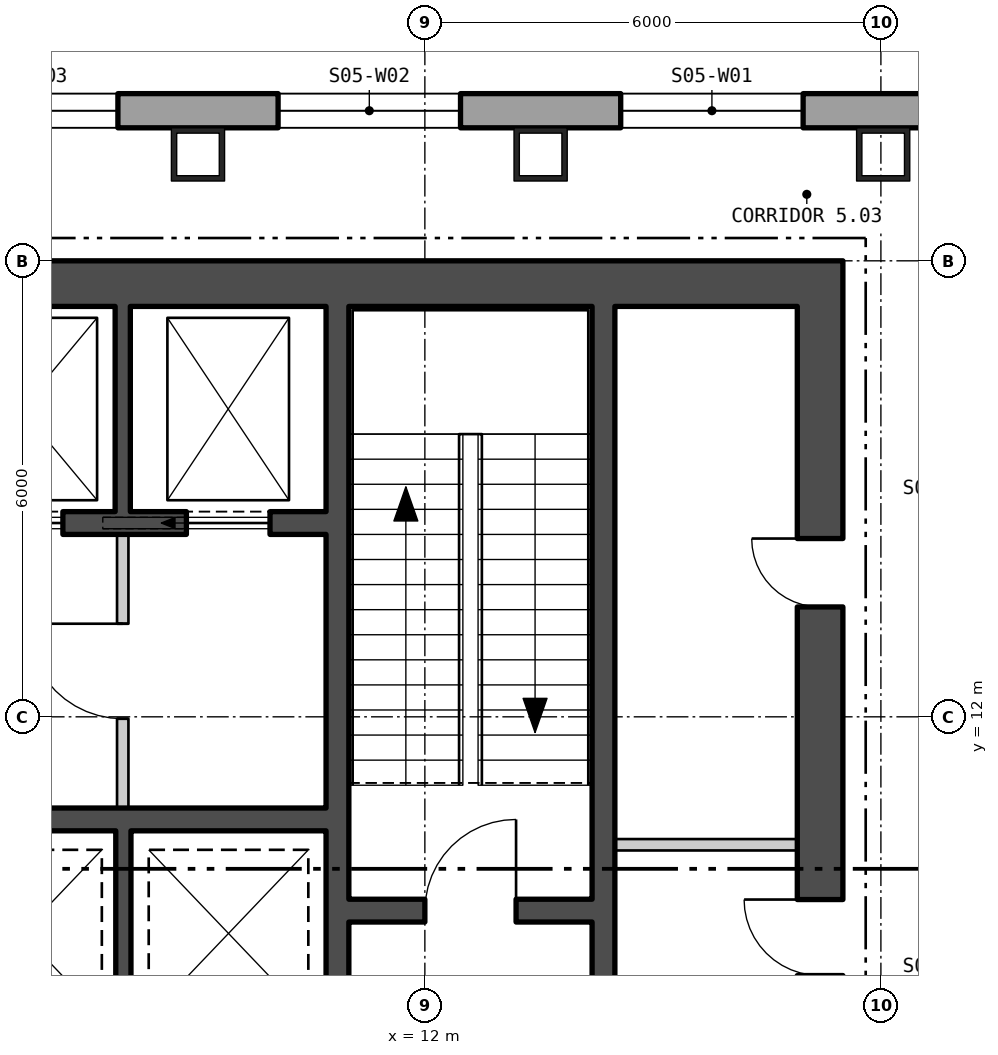
"""IFC4 building model, lengths in metres.
Left out: names, types, materials, properties, quantities, classifications, styles, units other than length and angle.
Written with IfcOpenShell. Run it as: python <this file> out.ifc"""

import sys

from ifc_helpers import new_model, si_unit, direction, frame, frame_2d, origin, origin_2d, place, context, subcontext, project, spatial, polyline, rectangle, hollow_rectangle, outline, extrude, element, fill, save


model = new_model("IFC4")
c1 = context("Model", 3, precision=1e-05, world=origin(), true_north=direction((0.0, 1.0)))
c2 = subcontext(c1, "Body", "Model", "MODEL_VIEW")
j1 = project(units=[si_unit("LENGTHUNIT", "METRE"), si_unit("PLANEANGLEUNIT", "RADIAN")], contexts=[c1])
p1 = place(None, origin())
s1 = spatial("IfcSite", under=j1, at=p1, CompositionType="ELEMENT")
p2 = place(p1, origin())
s2 = spatial("IfcBuilding", under=s1, at=p2, CompositionType="ELEMENT")
p3 = place(p2, frame((0.0, 0.0, 69.3)))
s3 = spatial("IfcBuildingStorey", under=s2, at=p3, CompositionType="ELEMENT", Elevation=69.3)
for number, where, z_axis, x_axis in (
    (1, (18.03, 19.4, 0.0), (0.0, 0.0, 1.0), (-1.0, 0.0, 0.0)),
    (2, (13.523, 19.4, 0.0), (0.0, 0.0, 1.0), (-1.0, 0.0, 0.0)),
    (3, (9.015, 19.4, 0.0), (0.0, 0.0, 1.0), (-1.0, 0.0, 0.0)),
):
    element("IfcColumn", number, at=place(p3, frame(where, z_axis=z_axis, x_axis=x_axis)), inside=s3, PredefinedType="COLUMN", context=c2, shape_type="SweptSolid", body=[
        extrude(hollow_rectangle(XDim=0.7, YDim=0.7, WallThickness=0.07, at=origin_2d()), origin(), (0.0, 0.0, 1.0), 4.5),
    ])
p4 = place(p3, frame((22.87, 19.975, -0.4), z_axis=(0.0, 0.0, 1.0), x_axis=(-1.0, 0.0, 0.0)))
e4 = element("IfcWall", 4, at=p4, inside=s3, PredefinedType="SOLIDWALL", context=c2, shape_type="SweptSolid", body=[
    extrude(outline(polyline([(-0.13, -0.225), (45.87, -0.225), (45.61, 0.225), (0.13, 0.225), (-0.13, -0.225)])), origin(), (0.0, 0.0, 1.0), 4.5),
])
p5 = place(p4, frame((5.893, 0.0, 1.3)))
e5 = element("IfcOpeningElement", 5, at=p5, cuts=e4, PredefinedType="OPENING", context=c2, shape_type="SweptSolid", body=[
    extrude(rectangle(XDim=2.4, YDim=2.6, at=frame_2d((1.2, 1.3))), frame((0.0, 0.235, 0.0), z_axis=(0.0, -1.0, 0.0), x_axis=(1.0, 0.0, 0.0)), (0.0, 0.0, 1.0), 0.47),
])
p6 = place(p4, frame((10.401, 0.0, 1.3)))
e6 = element("IfcOpeningElement", 6, at=p6, cuts=e4, PredefinedType="OPENING", context=c2, shape_type="SweptSolid", body=[
    extrude(rectangle(XDim=2.4, YDim=2.6, at=frame_2d((1.2, 1.3))), frame((0.0, 0.235, 0.0), z_axis=(0.0, -1.0, 0.0), x_axis=(1.0, 0.0, 0.0)), (0.0, 0.0, 1.0), 0.47),
])
p7 = place(p4, frame((14.909, 0.0, 1.3)))
e7 = element("IfcOpeningElement", 7, at=p7, cuts=e4, PredefinedType="OPENING", context=c2, shape_type="SweptSolid", body=[
    extrude(rectangle(XDim=2.4, YDim=2.6, at=frame_2d((1.2, 1.3))), frame((0.0, 0.235, 0.0), z_axis=(0.0, -1.0, 0.0), x_axis=(1.0, 0.0, 0.0)), (0.0, 0.0, 1.0), 0.47),
])
p8 = place(p4, frame((19.416, 0.0, 1.3)))
e8 = element("IfcOpeningElement", 8, at=p8, cuts=e4, PredefinedType="OPENING", context=c2, shape_type="SweptSolid", body=[
    extrude(rectangle(XDim=2.4, YDim=2.6, at=frame_2d((1.2, 1.3))), frame((0.0, 0.235, 0.0), z_axis=(0.0, -1.0, 0.0), x_axis=(1.0, 0.0, 0.0)), (0.0, 0.0, 1.0), 0.47),
])
p9 = place(p4, frame((23.924, 0.0, 1.3)))
e9 = element("IfcOpeningElement", 9, at=p9, cuts=e4, PredefinedType="OPENING", context=c2, shape_type="SweptSolid", body=[
    extrude(rectangle(XDim=2.4, YDim=2.6, at=frame_2d((1.2, 1.3))), frame((0.0, 0.235, 0.0), z_axis=(0.0, -1.0, 0.0), x_axis=(1.0, 0.0, 0.0)), (0.0, 0.0, 1.0), 0.47),
])
p10 = place(p4, frame((28.431, 0.0, 1.3)))
e10 = element("IfcOpeningElement", 10, at=p10, cuts=e4, PredefinedType="OPENING", context=c2, shape_type="SweptSolid", body=[
    extrude(rectangle(XDim=2.4, YDim=2.6, at=frame_2d((1.2, 1.3))), frame((0.0, 0.235, 0.0), z_axis=(0.0, -1.0, 0.0), x_axis=(1.0, 0.0, 0.0)), (0.0, 0.0, 1.0), 0.47),
])
p11 = place(p4, frame((32.939, 0.0, 1.3)))
e11 = element("IfcOpeningElement", 11, at=p11, cuts=e4, PredefinedType="OPENING", context=c2, shape_type="SweptSolid", body=[
    extrude(rectangle(XDim=2.4, YDim=2.6, at=frame_2d((1.2, 1.3))), frame((0.0, 0.235, 0.0), z_axis=(0.0, -1.0, 0.0), x_axis=(1.0, 0.0, 0.0)), (0.0, 0.0, 1.0), 0.47),
])
p12 = place(p4, frame((37.447, 0.0, 1.3)))
e12 = element("IfcOpeningElement", 12, at=p12, cuts=e4, PredefinedType="OPENING", context=c2, shape_type="SweptSolid", body=[
    extrude(rectangle(XDim=2.4, YDim=2.6, at=frame_2d((1.2, 1.3))), frame((0.0, 0.235, 0.0), z_axis=(0.0, -1.0, 0.0), x_axis=(1.0, 0.0, 0.0)), (0.0, 0.0, 1.0), 0.47),
])
p13 = place(p3, frame((5.31, -28.834, -0.18), z_axis=(0.0, 0.0, 1.0), x_axis=(0.500000711659, 0.866024992908, 0.0)))
e13 = element("IfcWall", 13, at=p13, inside=s3, PredefinedType="SOLIDWALL", context=c2, shape_type="SweptSolid", body=[
    extrude(outline(polyline([(-0.13, -0.225), (45.87, -0.225), (45.61, 0.225), (0.13, 0.225), (-0.13, -0.225)])), origin(), (0.0, 0.0, 1.0), 4.28),
])
p14 = place(p13, frame((1.424, 0.0, 1.08)))
e14 = element("IfcOpeningElement", 14, at=p14, cuts=e13, PredefinedType="OPENING", context=c2, shape_type="SweptSolid", body=[
    extrude(rectangle(XDim=2.4, YDim=2.6, at=frame_2d((1.2, 1.3))), frame((0.0, 0.235, 0.0), z_axis=(0.0, -1.0, 0.0), x_axis=(1.0, 0.0, 0.0)), (0.0, 0.0, 1.0), 0.47),
])
p15 = place(p13, frame((5.893, 0.0, 1.08)))
e15 = element("IfcOpeningElement", 15, at=p15, cuts=e13, PredefinedType="OPENING", context=c2, shape_type="SweptSolid", body=[
    extrude(rectangle(XDim=2.4, YDim=2.6, at=frame_2d((1.2, 1.3))), frame((0.0, 0.235, 0.0), z_axis=(0.0, -1.0, 0.0), x_axis=(1.0, 0.0, 0.0)), (0.0, 0.0, 1.0), 0.47),
])
p16 = place(p13, frame((10.401, 0.0, 1.08)))
e16 = element("IfcOpeningElement", 16, at=p16, cuts=e13, PredefinedType="OPENING", context=c2, shape_type="SweptSolid", body=[
    extrude(rectangle(XDim=2.4, YDim=2.6, at=frame_2d((1.2, 1.3))), frame((0.0, 0.235, 0.0), z_axis=(0.0, -1.0, 0.0), x_axis=(1.0, 0.0, 0.0)), (0.0, 0.0, 1.0), 0.47),
])
p17 = place(p13, frame((14.909, 0.0, 1.08)))
e17 = element("IfcOpeningElement", 17, at=p17, cuts=e13, PredefinedType="OPENING", context=c2, shape_type="SweptSolid", body=[
    extrude(rectangle(XDim=2.4, YDim=2.6, at=frame_2d((1.2, 1.3))), frame((0.0, 0.235, 0.0), z_axis=(0.0, -1.0, 0.0), x_axis=(1.0, 0.0, 0.0)), (0.0, 0.0, 1.0), 0.47),
])
p18 = place(p13, frame((19.416, 0.0, 1.08)))
e18 = element("IfcOpeningElement", 18, at=p18, cuts=e13, PredefinedType="OPENING", context=c2, shape_type="SweptSolid", body=[
    extrude(rectangle(XDim=2.4, YDim=2.6, at=frame_2d((1.2, 1.3))), frame((0.0, 0.235, 0.0), z_axis=(0.0, -1.0, 0.0), x_axis=(1.0, 0.0, 0.0)), (0.0, 0.0, 1.0), 0.47),
])
p19 = place(p13, frame((23.924, 0.0, 1.08)))
e19 = element("IfcOpeningElement", 19, at=p19, cuts=e13, PredefinedType="OPENING", context=c2, shape_type="SweptSolid", body=[
    extrude(rectangle(XDim=2.4, YDim=2.6, at=frame_2d((1.2, 1.3))), frame((0.0, 0.235, 0.0), z_axis=(0.0, -1.0, 0.0), x_axis=(1.0, 0.0, 0.0)), (0.0, 0.0, 1.0), 0.47),
])
p20 = place(p13, frame((28.431, 0.0, 1.08)))
e20 = element("IfcOpeningElement", 20, at=p20, cuts=e13, PredefinedType="OPENING", context=c2, shape_type="SweptSolid", body=[
    extrude(rectangle(XDim=2.4, YDim=2.6, at=frame_2d((1.2, 1.3))), frame((0.0, 0.235, 0.0), z_axis=(0.0, -1.0, 0.0), x_axis=(1.0, 0.0, 0.0)), (0.0, 0.0, 1.0), 0.47),
])
p21 = place(p13, frame((37.447, 0.0, 1.08)))
e21 = element("IfcOpeningElement", 21, at=p21, cuts=e13, PredefinedType="OPENING", context=c2, shape_type="SweptSolid", body=[
    extrude(rectangle(XDim=2.4, YDim=2.6, at=frame_2d((1.2, 1.3))), frame((0.0, 0.235, 0.0), z_axis=(0.0, -1.0, 0.0), x_axis=(1.0, 0.0, 0.0)), (0.0, 0.0, 1.0), 0.47),
])
p22 = place(p13, frame((41.916, 0.0, 1.08)))
e22 = element("IfcOpeningElement", 22, at=p22, cuts=e13, PredefinedType="OPENING", context=c2, shape_type="SweptSolid", body=[
    extrude(rectangle(XDim=2.4, YDim=2.6, at=frame_2d((1.2, 1.3))), frame((0.0, 0.235, 0.0), z_axis=(0.0, -1.0, 0.0), x_axis=(1.0, 0.0, 0.0)), (0.0, 0.0, 1.0), 0.47),
])
p23 = place(p3, frame((-17.5, 17.7, 0.0), z_axis=(0.0, 0.0, 1.0), x_axis=(1.0, 0.0, 0.0)))
e23 = element("IfcWall", 23, at=p23, inside=s3, PredefinedType="SHEAR", context=c2, shape_type="SweptSolid", body=[
    extrude(rectangle(XDim=35.0, YDim=0.6, at=frame_2d((17.5, 0.0))), origin(), (0.0, 0.0, 1.0), 4.3),
])
p24 = place(p3, frame((17.2, 0.6, 0.0), z_axis=(0.0, 0.0, 1.0), x_axis=(0.0, 1.0, 0.0)))
e24 = element("IfcWall", 24, at=p24, inside=s3, PredefinedType="SHEAR", context=c2, shape_type="SweptSolid", body=[
    extrude(rectangle(XDim=16.8, YDim=0.6, at=frame_2d((8.4, 0.0))), origin(), (0.0, 0.0, 1.0), 4.3),
])
p25 = place(p24, frame((5.7, 0.0, 0.0)))
e25 = element("IfcOpeningElement", 25, at=p25, cuts=e24, PredefinedType="OPENING", context=c2, shape_type="SweptSolid", body=[
    extrude(rectangle(XDim=1.5, YDim=2.1, at=frame_2d((0.75, 1.05))), frame((0.0, 0.31, 0.0), z_axis=(0.0, -1.0, 0.0), x_axis=(1.0, 0.0, 0.0)), (0.0, 0.0, 1.0), 0.62),
])
p26 = place(p24, frame((1.5, 0.0, 0.0)))
e26 = element("IfcOpeningElement", 26, at=p26, cuts=e24, PredefinedType="OPENING", context=c2, shape_type="SweptSolid", body=[
    extrude(rectangle(XDim=0.9, YDim=2.1, at=frame_2d((0.45, 1.05))), frame((0.0, 0.31, 0.0), z_axis=(0.0, -1.0, 0.0), x_axis=(1.0, 0.0, 0.0)), (0.0, 0.0, 1.0), 0.62),
])
p27 = place(p24, frame((4.35, 0.0, 0.0)))
e27 = element("IfcOpeningElement", 27, at=p27, cuts=e24, PredefinedType="OPENING", context=c2, shape_type="SweptSolid", body=[
    extrude(rectangle(XDim=0.9, YDim=2.1, at=frame_2d((0.45, 1.05))), frame((0.0, 0.31, 0.0), z_axis=(0.0, -1.0, 0.0), x_axis=(1.0, 0.0, 0.0)), (0.0, 0.0, 1.0), 0.62),
])
p28 = place(p24, frame((7.996, 0.0, 0.0)))
e28 = element("IfcOpeningElement", 28, at=p28, cuts=e24, PredefinedType="OPENING", context=c2, shape_type="SweptSolid", body=[
    extrude(rectangle(XDim=1.0, YDim=2.1, at=frame_2d((0.5, 1.05))), frame((0.0, 0.31, 0.0), z_axis=(0.0, -1.0, 0.0), x_axis=(1.0, 0.0, 0.0)), (0.0, 0.0, 1.0), 0.62),
])
p29 = place(p24, frame((12.846, 0.0, 0.0)))
e29 = element("IfcOpeningElement", 29, at=p29, cuts=e24, PredefinedType="OPENING", context=c2, shape_type="SweptSolid", body=[
    extrude(rectangle(XDim=0.9, YDim=2.1, at=frame_2d((0.45, 1.05))), frame((0.0, 0.31, 0.0), z_axis=(0.0, -1.0, 0.0), x_axis=(1.0, 0.0, 0.0)), (0.0, 0.0, 1.0), 0.62),
])
p30 = place(p3, frame((10.85, 0.6, 0.0), z_axis=(0.0, 0.0, 1.0), x_axis=(0.0, 1.0, 0.0)))
e30 = element("IfcWall", 30, at=p30, inside=s3, PredefinedType="SHEAR", context=c2, shape_type="SweptSolid", body=[
    extrude(rectangle(XDim=16.8, YDim=0.3, at=frame_2d((8.4, 0.0))), origin(), (0.0, 0.0, 1.0), 4.3),
])
p31 = place(p30, frame((5.075, 0.0, 0.0)))
e31 = element("IfcOpeningElement", 31, at=p31, cuts=e30, PredefinedType="OPENING", context=c2, shape_type="SweptSolid", body=[
    extrude(rectangle(XDim=1.25, YDim=2.1, at=frame_2d((0.625, 1.05))), frame((0.0, 0.16, 0.0), z_axis=(0.0, -1.0, 0.0), x_axis=(1.0, 0.0, 0.0)), (0.0, 0.0, 1.0), 0.32),
])
p32 = place(p30, frame((1.525, 0.0, 0.0)))
e32 = element("IfcOpeningElement", 32, at=p32, cuts=e30, PredefinedType="OPENING", context=c2, shape_type="SweptSolid", body=[
    extrude(rectangle(XDim=1.0, YDim=2.1, at=frame_2d((0.5, 1.05))), frame((0.0, 0.16, 0.0), z_axis=(0.0, -1.0, 0.0), x_axis=(1.0, 0.0, 0.0)), (0.0, 0.0, 1.0), 0.32),
])
p33 = place(p3, frame((14.35, 0.6, 0.0), z_axis=(0.0, 0.0, 1.0), x_axis=(0.0, 1.0, 0.0)))
e33 = element("IfcWall", 33, at=p33, inside=s3, PredefinedType="SHEAR", context=c2, shape_type="SweptSolid", body=[
    extrude(rectangle(XDim=16.8, YDim=0.3, at=frame_2d((8.4, 0.0))), origin(), (0.0, 0.0, 1.0), 4.3),
])
p34 = place(p33, frame((5.7, 0.0, 0.0)))
e34 = element("IfcOpeningElement", 34, at=p34, cuts=e33, PredefinedType="OPENING", context=c2, shape_type="SweptSolid", body=[
    extrude(rectangle(XDim=1.5, YDim=2.1, at=frame_2d((0.75, 1.05))), frame((0.0, 0.16, 0.0), z_axis=(0.0, -1.0, 0.0), x_axis=(1.0, 0.0, 0.0)), (0.0, 0.0, 1.0), 0.32),
])
p35 = place(p3, frame((11.0, 9.45, 0.0), z_axis=(0.0, 0.0, 1.0), x_axis=(1.0, 0.0, 0.0)))
e35 = element("IfcWall", 35, at=p35, inside=s3, PredefinedType="SHEAR", context=c2, shape_type="SweptSolid", body=[
    extrude(rectangle(XDim=3.2, YDim=0.3, at=frame_2d((1.6, 0.0))), origin(), (0.0, 0.0, 1.0), 4.3),
])
p36 = place(p35, frame((1.0, 0.0, 0.0)))
e36 = element("IfcOpeningElement", 36, at=p36, cuts=e35, PredefinedType="OPENING", context=c2, shape_type="SweptSolid", body=[
    extrude(rectangle(XDim=1.2, YDim=2.1, at=frame_2d((0.6, 1.05))), frame((0.0, 0.16, 0.0), z_axis=(0.0, -1.0, 0.0), x_axis=(1.0, 0.0, 0.0)), (0.0, 0.0, 1.0), 0.32),
])
p37 = place(p3, frame((-10.7, 14.55, 0.0), z_axis=(0.0, 0.0, 1.0), x_axis=(1.0, 0.0, 0.0)))
e37 = element("IfcWall", 37, at=p37, inside=s3, PredefinedType="SHEAR", context=c2, shape_type="SweptSolid", body=[
    extrude(rectangle(XDim=21.4, YDim=0.3, at=frame_2d((10.7, 0.0))), origin(), (0.0, 0.0, 1.0), 4.3),
])
p38 = place(p37, frame((0.738, 0.0, 0.0)))
e38 = element("IfcOpeningElement", 38, at=p38, cuts=e37, PredefinedType="OPENING", context=c2, shape_type="SweptSolid", body=[
    extrude(rectangle(XDim=1.1, YDim=2.1, at=frame_2d((0.55, 1.05))), frame((0.0, 0.16, 0.0), z_axis=(0.0, -1.0, 0.0), x_axis=(1.0, 0.0, 0.0)), (0.0, 0.0, 1.0), 0.32),
])
p39 = place(p37, frame((3.462, 0.0, 0.0)))
e39 = element("IfcOpeningElement", 39, at=p39, cuts=e37, PredefinedType="OPENING", context=c2, shape_type="SweptSolid", body=[
    extrude(rectangle(XDim=1.1, YDim=2.1, at=frame_2d((0.55, 1.05))), frame((0.0, 0.16, 0.0), z_axis=(0.0, -1.0, 0.0), x_axis=(1.0, 0.0, 0.0)), (0.0, 0.0, 1.0), 0.32),
])
p40 = place(p37, frame((6.138, 0.0, 0.0)))
e40 = element("IfcOpeningElement", 40, at=p40, cuts=e37, PredefinedType="OPENING", context=c2, shape_type="SweptSolid", body=[
    extrude(rectangle(XDim=1.1, YDim=2.1, at=frame_2d((0.55, 1.05))), frame((0.0, 0.16, 0.0), z_axis=(0.0, -1.0, 0.0), x_axis=(1.0, 0.0, 0.0)), (0.0, 0.0, 1.0), 0.32),
])
p41 = place(p37, frame((8.812, 0.0, 0.0)))
e41 = element("IfcOpeningElement", 41, at=p41, cuts=e37, PredefinedType="OPENING", context=c2, shape_type="SweptSolid", body=[
    extrude(rectangle(XDim=1.1, YDim=2.1, at=frame_2d((0.55, 1.05))), frame((0.0, 0.16, 0.0), z_axis=(0.0, -1.0, 0.0), x_axis=(1.0, 0.0, 0.0)), (0.0, 0.0, 1.0), 0.32),
])
p42 = place(p37, frame((14.162, 0.0, 0.0)))
e42 = element("IfcOpeningElement", 42, at=p42, cuts=e37, PredefinedType="OPENING", context=c2, shape_type="SweptSolid", body=[
    extrude(rectangle(XDim=1.1, YDim=2.1, at=frame_2d((0.55, 1.05))), frame((0.0, 0.16, 0.0), z_axis=(0.0, -1.0, 0.0), x_axis=(1.0, 0.0, 0.0)), (0.0, 0.0, 1.0), 0.32),
])
p43 = place(p37, frame((16.837, 0.0, 0.0)))
e43 = element("IfcOpeningElement", 43, at=p43, cuts=e37, PredefinedType="OPENING", context=c2, shape_type="SweptSolid", body=[
    extrude(rectangle(XDim=1.1, YDim=2.1, at=frame_2d((0.55, 1.05))), frame((0.0, 0.16, 0.0), z_axis=(0.0, -1.0, 0.0), x_axis=(1.0, 0.0, 0.0)), (0.0, 0.0, 1.0), 0.32),
])
p44 = place(p37, frame((19.562, 0.0, 0.0)))
e44 = element("IfcOpeningElement", 44, at=p44, cuts=e37, PredefinedType="OPENING", context=c2, shape_type="SweptSolid", body=[
    extrude(rectangle(XDim=1.1, YDim=2.1, at=frame_2d((0.55, 1.05))), frame((0.0, 0.16, 0.0), z_axis=(0.0, -1.0, 0.0), x_axis=(1.0, 0.0, 0.0)), (0.0, 0.0, 1.0), 0.32),
])
p45 = place(p3, frame((2.6, 10.65, 0.0), z_axis=(0.0, 0.0, 1.0), x_axis=(1.0, 0.0, 0.0)))
e45 = element("IfcWall", 45, at=p45, inside=s3, PredefinedType="SHEAR", context=c2, shape_type="SweptSolid", body=[
    extrude(rectangle(XDim=8.1, YDim=0.3, at=frame_2d((4.05, 0.0))), origin(), (0.0, 0.0, 1.0), 4.3),
])
for number, where, z_axis, x_axis in (
    (46, (8.025, 14.7, 0.0), (0.0, 0.0, 1.0), (0.0, 1.0, 0.0)),
    (47, (8.033, 7.8, 0.0), (0.0, 0.0, 1.0), (0.0, 1.0, 0.0)),
):
    element("IfcWall", number, at=place(p3, frame(where, z_axis=z_axis, x_axis=x_axis)), inside=s3, PredefinedType="SHEAR", context=c2, shape_type="SweptSolid", body=[
        extrude(rectangle(XDim=2.7, YDim=0.2, at=frame_2d((1.35, 0.0))), origin(), (0.0, 0.0, 1.0), 4.3),
    ])
p46 = place(p3, frame((8.025, 10.8, 0.0), z_axis=(0.0, 0.0, 1.0), x_axis=(0.0, 1.0, 0.0)))
e48 = element("IfcWall", 48, at=p46, inside=s3, PredefinedType="PARTITIONING", context=c2, shape_type="SweptSolid", body=[
    extrude(rectangle(XDim=3.6, YDim=0.15, at=frame_2d((1.8, 0.0))), origin(), (0.0, 0.0, 1.0), 4.3),
])
p47 = place(p46, frame((1.175, 0.0, 0.0)))
e49 = element("IfcOpeningElement", 49, at=p47, cuts=e48, PredefinedType="OPENING", context=c2, shape_type="SweptSolid", body=[
    extrude(rectangle(XDim=1.25, YDim=2.1, at=frame_2d((0.625, 1.05))), frame((0.0, 0.085, 0.0), z_axis=(0.0, -1.0, 0.0), x_axis=(1.0, 0.0, 0.0)), (0.0, 0.0, 1.0), 0.17),
])
p48 = place(p3, frame((14.5, 10.317, 0.0), z_axis=(0.0, 0.0, 1.0), x_axis=(1.0, 0.0, 0.0)))
e50 = element("IfcWall", 50, at=p48, inside=s3, PredefinedType="PARTITIONING", context=c2, shape_type="SweptSolid", body=[
    extrude(rectangle(XDim=2.4, YDim=0.15, at=frame_2d((1.2, 0.0))), origin(), (0.0, 0.0, 1.0), 4.3),
])
p49 = place(p5, origin())
e51 = element("IfcWindow", 51, at=p49, inside=s3, PartitioningType="SINGLE_PANEL", PredefinedType="WINDOW", context=c2, shape_type="SweptSolid", body=[
    extrude(rectangle(XDim=2.4, YDim=2.6, at=frame_2d((1.2, 1.3))), frame((0.0, 0.105, 0.0), z_axis=(0.0, -1.0, 0.0), x_axis=(1.0, 0.0, 0.0)), (0.0, 0.0, 1.0), 0.06),
])
fill(e5, e51)
p50 = place(p6, origin())
e52 = element("IfcWindow", 52, at=p50, inside=s3, PartitioningType="SINGLE_PANEL", PredefinedType="WINDOW", context=c2, shape_type="SweptSolid", body=[
    extrude(rectangle(XDim=2.4, YDim=2.6, at=frame_2d((1.2, 1.3))), frame((0.0, 0.105, 0.0), z_axis=(0.0, -1.0, 0.0), x_axis=(1.0, 0.0, 0.0)), (0.0, 0.0, 1.0), 0.06),
])
fill(e6, e52)
p51 = place(p7, origin())
e53 = element("IfcWindow", 53, at=p51, inside=s3, PartitioningType="SINGLE_PANEL", PredefinedType="WINDOW", context=c2, shape_type="SweptSolid", body=[
    extrude(rectangle(XDim=2.4, YDim=2.6, at=frame_2d((1.2, 1.3))), frame((0.0, 0.105, 0.0), z_axis=(0.0, -1.0, 0.0), x_axis=(1.0, 0.0, 0.0)), (0.0, 0.0, 1.0), 0.06),
])
fill(e7, e53)
p52 = place(p43, origin())
e54 = element("IfcDoor", 54, at=p52, inside=s3, OperationType="SLIDING_TO_LEFT", PredefinedType="DOOR", context=c2, shape_type="SweptSolid", body=[
    extrude(rectangle(XDim=1.1, YDim=2.1, at=frame_2d((0.55, 1.05))), frame((0.0, 0.025, 0.0), z_axis=(0.0, -1.0, 0.0), x_axis=(1.0, 0.0, 0.0)), (0.0, 0.0, 1.0), 0.05),
])
fill(e43, e54)
p53 = place(p44, origin())
e55 = element("IfcDoor", 55, at=p53, inside=s3, OperationType="SLIDING_TO_LEFT", PredefinedType="DOOR", context=c2, shape_type="SweptSolid", body=[
    extrude(rectangle(XDim=1.1, YDim=2.1, at=frame_2d((0.55, 1.05))), frame((0.0, 0.025, 0.0), z_axis=(0.0, -1.0, 0.0), x_axis=(1.0, 0.0, 0.0)), (0.0, 0.0, 1.0), 0.05),
])
fill(e44, e55)
p54 = place(p47, origin())
e56 = element("IfcDoor", 56, at=p54, inside=s3, OperationType="SINGLE_SWING_LEFT", PredefinedType="DOOR", context=c2, shape_type="SweptSolid", body=[
    extrude(rectangle(XDim=1.25, YDim=2.1, at=frame_2d((0.625, 1.05))), frame((0.0, 0.025, 0.0), z_axis=(0.0, -1.0, 0.0), x_axis=(1.0, 0.0, 0.0)), (0.0, 0.0, 1.0), 0.05),
])
fill(e49, e56)
p55 = place(p36, origin())
e57 = element("IfcDoor", 57, at=p55, inside=s3, OperationType="SINGLE_SWING_LEFT", PredefinedType="DOOR", context=c2, shape_type="SweptSolid", body=[
    extrude(rectangle(XDim=1.2, YDim=2.1, at=frame_2d((0.6, 1.05))), frame((0.0, 0.025, 0.0), z_axis=(0.0, -1.0, 0.0), x_axis=(1.0, 0.0, 0.0)), (0.0, 0.0, 1.0), 0.05),
])
fill(e36, e57)
p56 = place(p28, origin())
e58 = element("IfcDoor", 58, at=p56, inside=s3, OperationType="SINGLE_SWING_LEFT", PredefinedType="DOOR", context=c2, shape_type="SweptSolid", body=[
    extrude(rectangle(XDim=1.0, YDim=2.1, at=frame_2d((0.5, 1.05))), frame((0.0, 0.025, 0.0), z_axis=(0.0, -1.0, 0.0), x_axis=(1.0, 0.0, 0.0)), (0.0, 0.0, 1.0), 0.05),
])
fill(e28, e58)
p57 = place(p29, origin())
e59 = element("IfcDoor", 59, at=p57, inside=s3, OperationType="SINGLE_SWING_LEFT", PredefinedType="DOOR", context=c2, shape_type="SweptSolid", body=[
    extrude(rectangle(XDim=0.9, YDim=2.1, at=frame_2d((0.45, 1.05))), frame((0.0, 0.025, 0.0), z_axis=(0.0, -1.0, 0.0), x_axis=(1.0, 0.0, 0.0)), (0.0, 0.0, 1.0), 0.05),
])
fill(e29, e59)
save(model, sys.argv[1])
